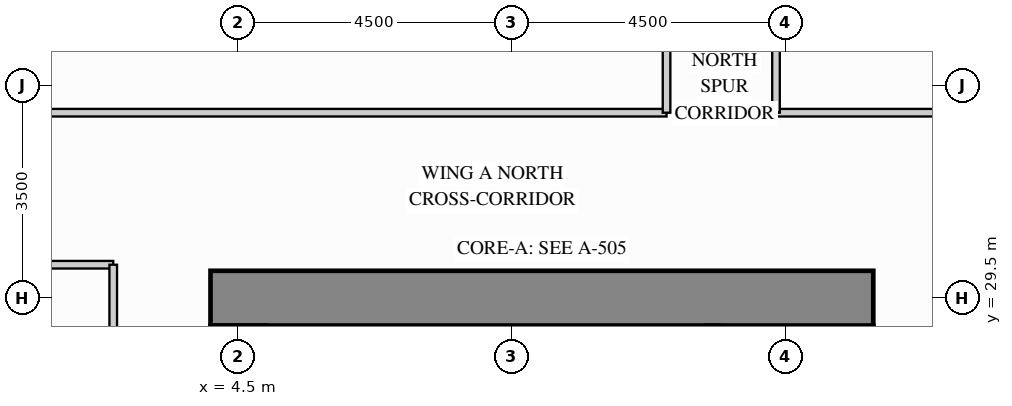
"""IFC4 building model, lengths in metres.
Left out: names, types, materials, properties, quantities, classifications, styles, units other than length and angle.
Written with IfcOpenShell. Run it as: python <this file> out.ifc"""

import sys

from ifc_helpers import new_model, si_unit, direction, frame, frame_2d, origin, place, context, subcontext, project, spatial, rectangle, extrude, source, transform, mapped, element, save


model = new_model("IFC4")
c1 = context("Model", 3, precision=1e-05, world=origin(), true_north=direction((0.0, 1.0)))
c2 = subcontext(c1, "Body", "Model", "MODEL_VIEW")
j1 = project(units=[si_unit("LENGTHUNIT", "METRE"), si_unit("PLANEANGLEUNIT", "RADIAN")], contexts=[c1])
p1 = place(None, origin())
s1 = spatial("IfcSite", under=j1, at=p1, CompositionType="ELEMENT")
p2 = place(p1, origin())
s2 = spatial("IfcBuilding", under=s1, at=p2, CompositionType="ELEMENT")
p3 = place(p2, frame((0.0, 0.0, 26.1)))
s3 = spatial("IfcBuildingStorey", under=s2, at=p3, CompositionType="ELEMENT", Elevation=26.1)
m1 = source(origin(), c2, "Body", "SweptSolid", [
    extrude(rectangle(XDim=10.9, YDim=0.9, at=frame_2d((5.45, 0.0))), origin(), (0.0, 0.0, 1.0), 3.38),
])
p4 = place(p3, frame((4.05, 29.5, 0.0), z_axis=(0.0, 0.0, 1.0), x_axis=(1.0, 0.0, 0.0)))
e1 = element("IfcWall", 1, at=p4, inside=s3, PredefinedType="SHEAR", context=c2, shape_type="MappedRepresentation", body=[
    mapped(m1, transform((0.0, 0.0, 0.0), x_axis=(1.0, 0.0, 0.0), y_axis=(0.0, 1.0, 0.0), z_axis=(0.0, 0.0, 1.0))),
])
m2 = source(origin(), c2, "Body", "SweptSolid", [
    extrude(rectangle(XDim=5.798, YDim=0.125, at=frame_2d((2.899, 0.0))), origin(), (0.0, 0.0, 1.0), 3.365),
])
p5 = place(p3, frame((13.35, 32.55, 0.0), z_axis=(0.0, 0.0, 1.0), x_axis=(1.0, 0.0, 0.0)))
e2 = element("IfcWall", 2, at=p5, inside=s3, PredefinedType="PARTITIONING", context=c2, shape_type="MappedRepresentation", body=[
    mapped(m2, transform((0.0, 0.0, 0.0), x_axis=(1.0, 0.0, 0.0), y_axis=(0.0, 1.0, 0.0), z_axis=(0.0, 0.0, 1.0))),
])
m3 = source(origin(), c2, "Body", "SweptSolid", [
    extrude(rectangle(XDim=11.198, YDim=0.125, at=frame_2d((5.599, 0.0))), origin(), (0.0, 0.0, 1.0), 3.365),
])
p6 = place(p3, frame((0.352, 32.55, 0.0), z_axis=(0.0, 0.0, 1.0), x_axis=(1.0, 0.0, 0.0)))
e3 = element("IfcWall", 3, at=p6, inside=s3, PredefinedType="PARTITIONING", context=c2, shape_type="MappedRepresentation", body=[
    mapped(m3, transform((0.0, 0.0, 0.0), x_axis=(1.0, 0.0, 0.0), y_axis=(0.0, 1.0, 0.0), z_axis=(0.0, 0.0, 1.0))),
])
m4 = source(origin(), c2, "Body", "SweptSolid", [
    extrude(rectangle(XDim=1.19, YDim=0.125, at=frame_2d((0.595, 0.0))), origin(), (0.0, 0.0, 1.0), 3.365),
])
p7 = place(p3, frame((1.26, 30.05, 0.0), z_axis=(0.0, 0.0, 1.0), x_axis=(1.0, 0.0, 0.0)))
e4 = element("IfcWall", 4, at=p7, inside=s3, PredefinedType="PARTITIONING", context=c2, shape_type="MappedRepresentation", body=[
    mapped(m4, transform((0.0, 0.0, 0.0), x_axis=(1.0, 0.0, 0.0), y_axis=(0.0, 1.0, 0.0), z_axis=(0.0, 0.0, 1.0))),
])
p8 = place(p3, frame((13.35, 32.55, 0.0), z_axis=(0.0, 0.0, 1.0), x_axis=(0.0, 1.0, 0.0)))
e5 = element("IfcWall", 5, at=p8, inside=s3, PredefinedType="PARTITIONING", context=c2, shape_type="SweptSolid", body=[
    extrude(rectangle(XDim=7.202, YDim=0.125, at=frame_2d((3.601, 0.0))), origin(), (0.0, 0.0, 1.0), 3.365),
])
p9 = place(p8, frame((3.126, 0.0, 0.0)))
e6 = element("IfcOpeningElement", 6, at=p9, cuts=e5, PredefinedType="OPENING", context=c2, shape_type="SweptSolid", body=[
    extrude(rectangle(XDim=0.95, YDim=2.15, at=frame_2d((0.475, 1.075))), frame((0.0, 0.073, 0.0), z_axis=(0.0, -1.0, 0.0), x_axis=(1.0, 0.0, 0.0)), (0.0, 0.0, 1.0), 0.145),
])
p10 = place(p3, frame((11.55, 32.55, 0.0), z_axis=(0.0, 0.0, 1.0), x_axis=(0.0, 1.0, 0.0)))
e7 = element("IfcWall", 7, at=p10, inside=s3, PredefinedType="PARTITIONING", context=c2, shape_type="SweptSolid", body=[
    extrude(rectangle(XDim=4.847, YDim=0.125, at=frame_2d((2.423, 0.0))), origin(), (0.0, 0.0, 1.0), 3.365),
])
p11 = place(p10, frame((1.948, 0.0, 0.0)))
e8 = element("IfcOpeningElement", 8, at=p11, cuts=e7, PredefinedType="OPENING", context=c2, shape_type="SweptSolid", body=[
    extrude(rectangle(XDim=0.95, YDim=2.15, at=frame_2d((0.475, 1.075))), frame((0.0, 0.073, 0.0), z_axis=(0.0, -1.0, 0.0), x_axis=(1.0, 0.0, 0.0)), (0.0, 0.0, 1.0), 0.145),
])
p12 = place(p3, frame((2.45, 22.6, 0.0), z_axis=(0.0, 0.0, 1.0), x_axis=(0.0, 1.0, 0.0)))
e9 = element("IfcWall", 9, at=p12, inside=s3, PredefinedType="PARTITIONING", context=c2, shape_type="SweptSolid", body=[
    extrude(rectangle(XDim=7.45, YDim=0.125, at=frame_2d((3.725, 0.0))), origin(), (0.0, 0.0, 1.0), 3.365),
])
p13 = place(p12, frame((2.227, 0.0, 0.0)))
e10 = element("IfcOpeningElement", 10, at=p13, cuts=e9, PredefinedType="OPENING", context=c2, shape_type="SweptSolid", body=[
    extrude(rectangle(XDim=0.95, YDim=2.15, at=frame_2d((0.475, 1.075))), frame((0.0, 0.073, 0.0), z_axis=(0.0, -1.0, 0.0), x_axis=(1.0, 0.0, 0.0)), (0.0, 0.0, 1.0), 0.145),
])
save(model, sys.argv[1])
